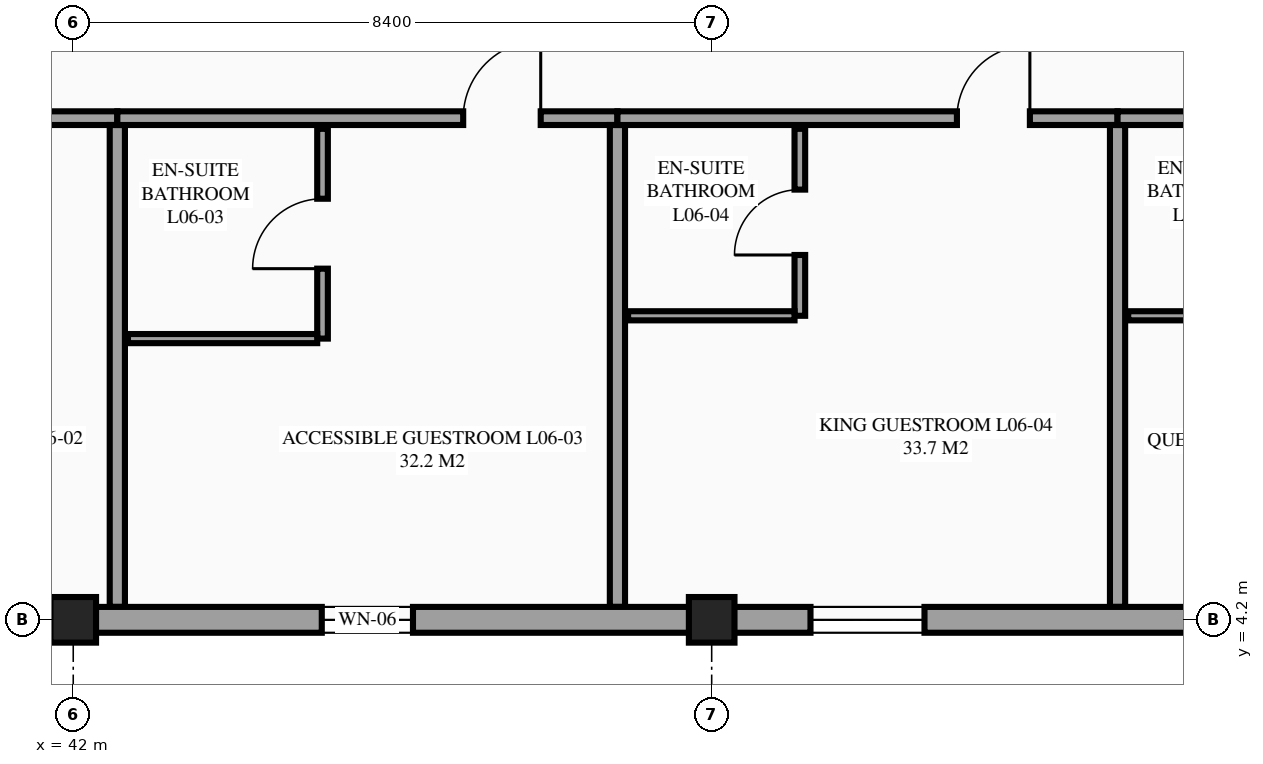
"""IFC4 building model, lengths in metres.
Left out: names, types, materials, properties, quantities, classifications, styles, units other than length and angle.
Written with IfcOpenShell. Run it as: python <this file> out.ifc"""

import sys

from ifc_helpers import new_model, si_unit, direction, frame, frame_2d, origin, origin_2d, place, context, subcontext, project, spatial, rectangle, extrude, element, fill, save


model = new_model("IFC4")
c1 = context("Model", 3, precision=1e-05, world=origin(), true_north=direction((0.0, 1.0)))
c2 = subcontext(c1, "Body", "Model", "MODEL_VIEW")
j1 = project(units=[si_unit("LENGTHUNIT", "METRE"), si_unit("PLANEANGLEUNIT", "RADIAN")], contexts=[c1])
p1 = place(None, origin())
s1 = spatial("IfcSite", under=j1, at=p1, CompositionType="ELEMENT")
p2 = place(p1, origin())
s2 = spatial("IfcBuilding", under=s1, at=p2, CompositionType="ELEMENT")
p3 = place(p2, frame((0.0, 0.0, 25.5)))
s3 = spatial("IfcBuildingStorey", under=s2, at=p3, CompositionType="ELEMENT", Elevation=25.5)
for number, where, z_axis, x_axis in (
    (1, (42.0, 4.2, 0.0), (0.0, 0.0, 1.0), (1.0, 0.0, 0.0)),
    (2, (50.4, 4.2, 0.0), (0.0, 0.0, 1.0), (1.0, 0.0, 0.0)),
):
    element("IfcColumn", number, at=place(p3, frame(where, z_axis=z_axis, x_axis=x_axis)), inside=s3, PredefinedType="COLUMN", context=c2, shape_type="SweptSolid", body=[
        extrude(rectangle(XDim=0.6, YDim=0.6, at=origin_2d()), origin(), (0.0, 0.0, 1.0), 3.6),
    ])
p4 = place(p3, frame((36.0, 10.8, 0.0), z_axis=(0.0, 0.0, 1.0), x_axis=(1.0, 0.0, 0.0)))
e3 = element("IfcWall", 3, at=p4, inside=s3, PredefinedType="PARTITIONING", context=c2, shape_type="SweptSolid", body=[
    extrude(rectangle(XDim=6.58, YDim=0.18, at=frame_2d((3.29, 0.0))), origin(), (0.0, 0.0, 1.0), 3.375),
])
p5 = place(p4, frame((3.5, 0.0, 0.0)))
e4 = element("IfcOpeningElement", 4, at=p5, cuts=e3, PredefinedType="OPENING", context=c2, shape_type="SweptSolid", body=[
    extrude(rectangle(XDim=1.02, YDim=2.15, at=frame_2d((0.51, 1.075))), frame((0.0, 0.1, 0.0), z_axis=(0.0, -1.0, 0.0), x_axis=(1.0, 0.0, 0.0)), (0.0, 0.0, 1.0), 0.2),
])
p6 = place(p3, frame((42.58, 4.37, 0.0), z_axis=(0.0, 0.0, 1.0), x_axis=(0.0, 1.0, 0.0)))
e5 = element("IfcWall", 5, at=p6, inside=s3, PredefinedType="PARTITIONING", context=c2, shape_type="SweptSolid", body=[
    extrude(rectangle(XDim=6.34, YDim=0.2, at=frame_2d((3.17, 0.0))), origin(), (0.0, 0.0, 1.0), 3.375),
])
p7 = place(p3, frame((42.58, 10.8, 0.0), z_axis=(0.0, 0.0, 1.0), x_axis=(1.0, 0.0, 0.0)))
e6 = element("IfcWall", 6, at=p7, inside=s3, PredefinedType="PARTITIONING", context=c2, shape_type="SweptSolid", body=[
    extrude(rectangle(XDim=6.58, YDim=0.18, at=frame_2d((3.29, 0.0))), origin(), (0.0, 0.0, 1.0), 3.375),
])
p8 = place(p7, frame((4.551, 0.0, 0.0)))
e7 = element("IfcOpeningElement", 7, at=p8, cuts=e6, PredefinedType="OPENING", context=c2, shape_type="SweptSolid", body=[
    extrude(rectangle(XDim=1.02, YDim=2.15, at=frame_2d((0.51, 1.075))), frame((0.0, 0.1, 0.0), z_axis=(0.0, -1.0, 0.0), x_axis=(1.0, 0.0, 0.0)), (0.0, 0.0, 1.0), 0.2),
])
p9 = place(p3, frame((49.16, 4.37, 0.0), z_axis=(0.0, 0.0, 1.0), x_axis=(0.0, 1.0, 0.0)))
e8 = element("IfcWall", 8, at=p9, inside=s3, PredefinedType="PARTITIONING", context=c2, shape_type="SweptSolid", body=[
    extrude(rectangle(XDim=6.34, YDim=0.2, at=frame_2d((3.17, 0.0))), origin(), (0.0, 0.0, 1.0), 3.375),
])
p10 = place(p3, frame((45.28, 7.9, 0.0), z_axis=(0.0, 0.0, 1.0), x_axis=(0.0, 1.0, 0.0)))
e9 = element("IfcWall", 9, at=p10, inside=s3, PredefinedType="PARTITIONING", context=c2, shape_type="SweptSolid", body=[
    extrude(rectangle(XDim=2.76, YDim=0.14, at=frame_2d((1.38, 0.0))), origin(), (0.0, 0.0, 1.0), 3.375),
])
p11 = place(p10, frame((0.92, 0.0, 0.0)))
e10 = element("IfcOpeningElement", 10, at=p11, cuts=e9, PredefinedType="OPENING", context=c2, shape_type="SweptSolid", body=[
    extrude(rectangle(XDim=0.92, YDim=2.1, at=frame_2d((0.46, 1.05))), frame((0.0, 0.08, 0.0), z_axis=(0.0, -1.0, 0.0), x_axis=(1.0, 0.0, 0.0)), (0.0, 0.0, 1.0), 0.16),
])
p12 = place(p3, frame((42.72, 7.9, 0.0), z_axis=(0.0, 0.0, 1.0), x_axis=(1.0, 0.0, 0.0)))
e11 = element("IfcWall", 11, at=p12, inside=s3, PredefinedType="PARTITIONING", context=c2, shape_type="SweptSolid", body=[
    extrude(rectangle(XDim=2.49, YDim=0.12, at=frame_2d((1.245, 0.0))), origin(), (0.0, 0.0, 1.0), 3.375),
])
p13 = place(p3, frame((49.16, 10.8, 0.0), z_axis=(0.0, 0.0, 1.0), x_axis=(1.0, 0.0, 0.0)))
e12 = element("IfcWall", 12, at=p13, inside=s3, PredefinedType="PARTITIONING", context=c2, shape_type="SweptSolid", body=[
    extrude(rectangle(XDim=6.58, YDim=0.18, at=frame_2d((3.29, 0.0))), origin(), (0.0, 0.0, 1.0), 3.375),
])
p14 = place(p13, frame((4.467, 0.0, 0.0)))
e13 = element("IfcOpeningElement", 13, at=p14, cuts=e12, PredefinedType="OPENING", context=c2, shape_type="SweptSolid", body=[
    extrude(rectangle(XDim=0.96, YDim=2.15, at=frame_2d((0.48, 1.075))), frame((0.0, 0.1, 0.0), z_axis=(0.0, -1.0, 0.0), x_axis=(1.0, 0.0, 0.0)), (0.0, 0.0, 1.0), 0.2),
])
p15 = place(p3, frame((55.74, 4.37, 0.0), z_axis=(0.0, 0.0, 1.0), x_axis=(0.0, 1.0, 0.0)))
e14 = element("IfcWall", 14, at=p15, inside=s3, PredefinedType="PARTITIONING", context=c2, shape_type="SweptSolid", body=[
    extrude(rectangle(XDim=6.34, YDim=0.2, at=frame_2d((3.17, 0.0))), origin(), (0.0, 0.0, 1.0), 3.375),
])
p16 = place(p3, frame((51.56, 8.2, 0.0), z_axis=(0.0, 0.0, 1.0), x_axis=(0.0, 1.0, 0.0)))
e15 = element("IfcWall", 15, at=p16, inside=s3, PredefinedType="PARTITIONING", context=c2, shape_type="SweptSolid", body=[
    extrude(rectangle(XDim=2.46, YDim=0.14, at=frame_2d((1.23, 0.0))), origin(), (0.0, 0.0, 1.0), 3.375),
])
p17 = place(p16, frame((0.8, 0.0, 0.0)))
e16 = element("IfcOpeningElement", 16, at=p17, cuts=e15, PredefinedType="OPENING", context=c2, shape_type="SweptSolid", body=[
    extrude(rectangle(XDim=0.86, YDim=2.1, at=frame_2d((0.43, 1.05))), frame((0.0, 0.08, 0.0), z_axis=(0.0, -1.0, 0.0), x_axis=(1.0, 0.0, 0.0)), (0.0, 0.0, 1.0), 0.16),
])
p18 = place(p3, frame((49.3, 8.2, 0.0), z_axis=(0.0, 0.0, 1.0), x_axis=(1.0, 0.0, 0.0)))
e17 = element("IfcWall", 17, at=p18, inside=s3, PredefinedType="PARTITIONING", context=c2, shape_type="SweptSolid", body=[
    extrude(rectangle(XDim=2.19, YDim=0.12, at=frame_2d((1.095, 0.0))), origin(), (0.0, 0.0, 1.0), 3.375),
])
p19 = place(p3, frame((55.74, 10.8, 0.0), z_axis=(0.0, 0.0, 1.0), x_axis=(1.0, 0.0, 0.0)))
e18 = element("IfcWall", 18, at=p19, inside=s3, PredefinedType="PARTITIONING", context=c2, shape_type="SweptSolid", body=[
    extrude(rectangle(XDim=6.58, YDim=0.18, at=frame_2d((3.29, 0.0))), origin(), (0.0, 0.0, 1.0), 3.375),
])
p20 = place(p19, frame((4.467, 0.0, 0.0)))
e19 = element("IfcOpeningElement", 19, at=p20, cuts=e18, PredefinedType="OPENING", context=c2, shape_type="SweptSolid", body=[
    extrude(rectangle(XDim=0.96, YDim=2.15, at=frame_2d((0.48, 1.075))), frame((0.0, 0.1, 0.0), z_axis=(0.0, -1.0, 0.0), x_axis=(1.0, 0.0, 0.0)), (0.0, 0.0, 1.0), 0.2),
])
p21 = place(p3, frame((55.88, 8.2, 0.0), z_axis=(0.0, 0.0, 1.0), x_axis=(1.0, 0.0, 0.0)))
e20 = element("IfcWall", 20, at=p21, inside=s3, PredefinedType="PARTITIONING", context=c2, shape_type="SweptSolid", body=[
    extrude(rectangle(XDim=2.19, YDim=0.12, at=frame_2d((1.095, 0.0))), origin(), (0.0, 0.0, 1.0), 3.375),
])
p22 = place(p3, frame((33.6, 4.2, 0.0), z_axis=(0.0, 0.0, 1.0), x_axis=(1.0, 0.0, 0.0)))
e21 = element("IfcWall", 21, at=p22, inside=s3, PredefinedType="STANDARD", context=c2, shape_type="SweptSolid", body=[
    extrude(rectangle(XDim=8.4, YDim=0.34, at=frame_2d((4.2, 0.0))), origin(), (0.0, 0.0, 1.0), 3.07),
])
p23 = place(p22, frame((4.94, 0.0, 0.85)))
e22 = element("IfcOpeningElement", 22, at=p23, cuts=e21, PredefinedType="OPENING", context=c2, shape_type="SweptSolid", body=[
    extrude(rectangle(XDim=1.5, YDim=1.5, at=frame_2d((0.75, 0.75))), frame((0.0, 0.18, 0.0), z_axis=(0.0, -1.0, 0.0), x_axis=(1.0, 0.0, 0.0)), (0.0, 0.0, 1.0), 0.36),
])
p24 = place(p3, frame((42.0, 4.2, 0.0), z_axis=(0.0, 0.0, 1.0), x_axis=(1.0, 0.0, 0.0)))
e23 = element("IfcWall", 23, at=p24, inside=s3, PredefinedType="STANDARD", context=c2, shape_type="SweptSolid", body=[
    extrude(rectangle(XDim=16.8, YDim=0.34, at=frame_2d((8.4, 0.0))), origin(), (0.0, 0.0, 1.0), 2.68),
])
p25 = place(p24, frame((3.27, 0.0, 0.85)))
e24 = element("IfcOpeningElement", 24, at=p25, cuts=e23, PredefinedType="OPENING", context=c2, shape_type="SweptSolid", body=[
    extrude(rectangle(XDim=1.2, YDim=1.5, at=frame_2d((0.6, 0.75))), frame((0.0, 0.18, 0.0), z_axis=(0.0, -1.0, 0.0), x_axis=(1.0, 0.0, 0.0)), (0.0, 0.0, 1.0), 0.36),
])
p26 = place(p24, frame((9.7, 0.0, 0.85)))
e25 = element("IfcOpeningElement", 25, at=p26, cuts=e23, PredefinedType="OPENING", context=c2, shape_type="SweptSolid", body=[
    extrude(rectangle(XDim=1.5, YDim=1.5, at=frame_2d((0.75, 0.75))), frame((0.0, 0.18, 0.0), z_axis=(0.0, -1.0, 0.0), x_axis=(1.0, 0.0, 0.0)), (0.0, 0.0, 1.0), 0.36),
])
p27 = place(p25, origin())
e26 = element("IfcWindow", 26, at=p27, inside=s3, PartitioningType="SINGLE_PANEL", PredefinedType="WINDOW", context=c2, shape_type="SweptSolid", body=[
    extrude(rectangle(XDim=1.2, YDim=1.5, at=frame_2d((0.6, 0.75))), frame((0.0, 0.03, 0.0), z_axis=(0.0, -1.0, 0.0), x_axis=(1.0, 0.0, 0.0)), (0.0, 0.0, 1.0), 0.06),
])
fill(e24, e26)
p28 = place(p26, origin())
e27 = element("IfcWindow", 27, at=p28, inside=s3, PartitioningType="SINGLE_PANEL", PredefinedType="WINDOW", context=c2, shape_type="SweptSolid", body=[
    extrude(rectangle(XDim=1.5, YDim=1.5, at=frame_2d((0.75, 0.75))), frame((0.0, 0.03, 0.0), z_axis=(0.0, -1.0, 0.0), x_axis=(1.0, 0.0, 0.0)), (0.0, 0.0, 1.0), 0.06),
])
fill(e25, e27)
p29 = place(p8, origin())
e28 = element("IfcDoor", 28, at=p29, inside=s3, OperationType="SINGLE_SWING_RIGHT", PredefinedType="DOOR", context=c2, shape_type="SweptSolid", body=[
    extrude(rectangle(XDim=1.02, YDim=2.15, at=frame_2d((0.51, 1.075))), frame((0.0, 0.025, 0.0), z_axis=(0.0, -1.0, 0.0), x_axis=(1.0, 0.0, 0.0)), (0.0, 0.0, 1.0), 0.05),
])
fill(e7, e28)
p30 = place(p11, origin())
e29 = element("IfcDoor", 29, at=p30, inside=s3, OperationType="SINGLE_SWING_LEFT", PredefinedType="DOOR", context=c2, shape_type="SweptSolid", body=[
    extrude(rectangle(XDim=0.92, YDim=2.1, at=frame_2d((0.46, 1.05))), frame((0.0, 0.025, 0.0), z_axis=(0.0, -1.0, 0.0), x_axis=(1.0, 0.0, 0.0)), (0.0, 0.0, 1.0), 0.05),
])
fill(e10, e29)
p31 = place(p14, origin())
e30 = element("IfcDoor", 30, at=p31, inside=s3, OperationType="SINGLE_SWING_RIGHT", PredefinedType="DOOR", context=c2, shape_type="SweptSolid", body=[
    extrude(rectangle(XDim=0.96, YDim=2.15, at=frame_2d((0.48, 1.075))), frame((0.0, 0.025, 0.0), z_axis=(0.0, -1.0, 0.0), x_axis=(1.0, 0.0, 0.0)), (0.0, 0.0, 1.0), 0.05),
])
fill(e13, e30)
p32 = place(p17, origin())
e31 = element("IfcDoor", 31, at=p32, inside=s3, OperationType="SINGLE_SWING_LEFT", PredefinedType="DOOR", context=c2, shape_type="SweptSolid", body=[
    extrude(rectangle(XDim=0.86, YDim=2.1, at=frame_2d((0.43, 1.05))), frame((0.0, 0.025, 0.0), z_axis=(0.0, -1.0, 0.0), x_axis=(1.0, 0.0, 0.0)), (0.0, 0.0, 1.0), 0.05),
])
fill(e16, e31)
save(model, sys.argv[1])
